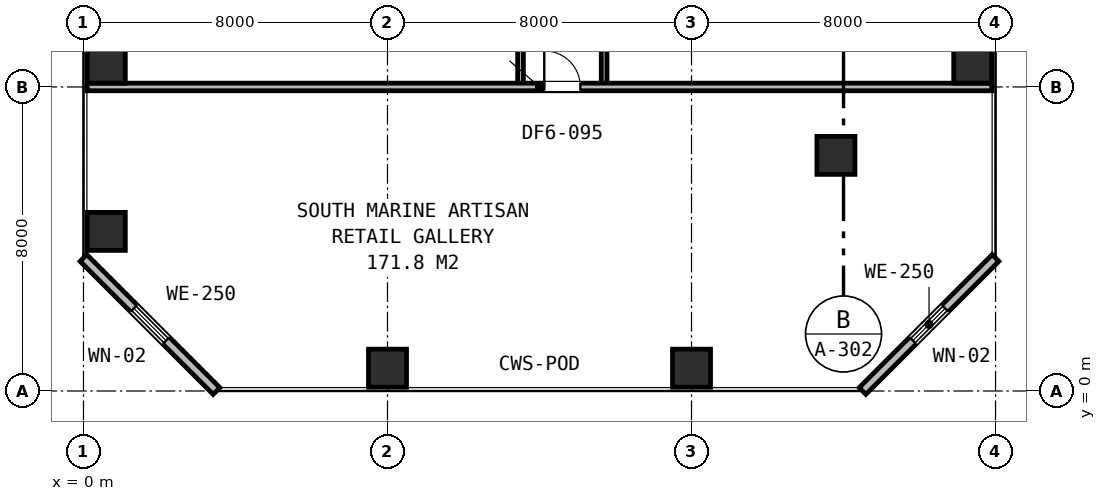
"""IFC4 building model, lengths in metres.
Left out: names, types, materials, properties, quantities, classifications, styles, units other than length and angle.
Written with IfcOpenShell. Run it as: python <this file> out.ifc"""

import sys

from ifc_helpers import new_model, si_unit, direction, frame, frame_2d, origin, origin_2d, place, context, subcontext, project, spatial, rectangle, extrude, element, fill, save


model = new_model("IFC4")
c1 = context("Model", 3, precision=1e-05, world=origin(), true_north=direction((0.0, 1.0)))
c2 = subcontext(c1, "Body", "Model", "MODEL_VIEW")
j1 = project(units=[si_unit("LENGTHUNIT", "METRE"), si_unit("PLANEANGLEUNIT", "RADIAN")], contexts=[c1])
p1 = place(None, origin())
s1 = spatial("IfcSite", under=j1, at=p1, CompositionType="ELEMENT")
p2 = place(p1, origin())
s2 = spatial("IfcBuilding", under=s1, at=p2, CompositionType="ELEMENT")
p3 = place(p2, frame((0.0, 0.0, 6.0)))
s3 = spatial("IfcBuildingStorey", under=s2, at=p3, CompositionType="ELEMENT", Elevation=6.0)
for number, where, z_axis, x_axis in (
    (1, (0.6, 8.6, 0.0), (0.0, 0.0, 1.0), (1.0, 0.0, 0.0)),
    (2, (0.6, 4.2, 0.0), (0.0, 0.0, 1.0), (1.0, 0.0, 0.0)),
    (3, (8.0, 0.6, 0.0), (0.0, 0.0, 1.0), (1.0, 0.0, 0.0)),
    (4, (16.0, 0.6, 0.0), (0.0, 0.0, 1.0), (1.0, 0.0, 0.0)),
    (5, (19.8, 6.2, 0.0), (0.0, 0.0, 1.0), (1.0, 0.0, 0.0)),
    (6, (23.4, 8.6, 0.0), (0.0, 0.0, 1.0), (1.0, 0.0, 0.0)),
):
    element("IfcColumn", number, at=place(p3, frame(where, z_axis=z_axis, x_axis=x_axis)), inside=s3, PredefinedType="COLUMN", context=c2, shape_type="SweptSolid", body=[
        extrude(rectangle(XDim=1.0, YDim=1.0, at=origin_2d()), origin(), (0.0, 0.0, 1.0), 5.1),
    ])
p4 = place(p3, frame((20.5, 0.0, 0.0), z_axis=(0.0, 0.0, 1.0), x_axis=(0.707106781187, 0.707106781187, 0.0)))
e7 = element("IfcWall", 7, at=p4, inside=s3, PredefinedType="STANDARD", context=c2, shape_type="SweptSolid", body=[
    extrude(rectangle(XDim=4.95, YDim=0.25, at=frame_2d((2.475, 0.0))), origin(), (0.0, 0.0, 1.0), 4.77),
])
p5 = place(p4, frame((1.875, 0.0, 0.85)))
e8 = element("IfcOpeningElement", 8, at=p5, cuts=e7, PredefinedType="OPENING", context=c2, shape_type="SweptSolid", body=[
    extrude(rectangle(XDim=1.2, YDim=1.6, at=frame_2d((0.6, 0.8))), frame((0.0, 0.135, 0.0), z_axis=(0.0, -1.0, 0.0), x_axis=(1.0, 0.0, 0.0)), (0.0, 0.0, 1.0), 0.27),
])
p6 = place(p3, frame((0.0, 3.5, 0.0), z_axis=(0.0, 0.0, 1.0), x_axis=(0.707106781187, -0.707106781187, 0.0)))
e9 = element("IfcWall", 9, at=p6, inside=s3, PredefinedType="STANDARD", context=c2, shape_type="SweptSolid", body=[
    extrude(rectangle(XDim=4.95, YDim=0.25, at=frame_2d((2.475, 0.0))), origin(), (0.0, 0.0, 1.0), 4.77),
])
p7 = place(p6, frame((1.875, 0.0, 0.85)))
e10 = element("IfcOpeningElement", 10, at=p7, cuts=e9, PredefinedType="OPENING", context=c2, shape_type="SweptSolid", body=[
    extrude(rectangle(XDim=1.2, YDim=1.6, at=frame_2d((0.6, 0.8))), frame((0.0, 0.135, 0.0), z_axis=(0.0, -1.0, 0.0), x_axis=(1.0, 0.0, 0.0)), (0.0, 0.0, 1.0), 0.27),
])
p8 = place(p3, frame((11.5, 8.0, 0.0), z_axis=(0.0, 0.0, 1.0), x_axis=(0.0, 1.0, 0.0)))
e11 = element("IfcWall", 11, at=p8, inside=s3, PredefinedType="PARTITIONING", context=c2, shape_type="SweptSolid", body=[
    extrude(rectangle(XDim=20.4, YDim=0.15, at=frame_2d((10.2, 0.0))), origin(), (0.0, 0.0, 1.0), 4.12),
])
p9 = place(p8, frame((9.3, 0.0, 0.0)))
e12 = element("IfcOpeningElement", 12, at=p9, cuts=e11, PredefinedType="OPENING", context=c2, shape_type="SweptSolid", body=[
    extrude(rectangle(XDim=1.8, YDim=2.15, at=frame_2d((0.9, 1.075))), frame((0.0, 0.085, 0.0), z_axis=(0.0, -1.0, 0.0), x_axis=(1.0, 0.0, 0.0)), (0.0, 0.0, 1.0), 0.17),
])
p10 = place(p3, frame((13.7, 8.0, 0.0), z_axis=(0.0, 0.0, 1.0), x_axis=(0.0, 1.0, 0.0)))
e13 = element("IfcWall", 13, at=p10, inside=s3, PredefinedType="PARTITIONING", context=c2, shape_type="SweptSolid", body=[
    extrude(rectangle(XDim=20.4, YDim=0.15, at=frame_2d((10.2, 0.0))), origin(), (0.0, 0.0, 1.0), 4.12),
])
p11 = place(p10, frame((9.3, 0.0, 0.0)))
e14 = element("IfcOpeningElement", 14, at=p11, cuts=e13, PredefinedType="OPENING", context=c2, shape_type="SweptSolid", body=[
    extrude(rectangle(XDim=1.8, YDim=2.15, at=frame_2d((0.9, 1.075))), frame((0.0, 0.085, 0.0), z_axis=(0.0, -1.0, 0.0), x_axis=(1.0, 0.0, 0.0)), (0.0, 0.0, 1.0), 0.17),
])
p12 = place(p3, frame((0.1, 8.0, 0.0), z_axis=(0.0, 0.0, 1.0), x_axis=(1.0, 0.0, 0.0)))
e15 = element("IfcWall", 15, at=p12, inside=s3, PredefinedType="PARTITIONING", context=c2, shape_type="SweptSolid", body=[
    extrude(rectangle(XDim=23.8, YDim=0.2, at=frame_2d((11.9, 0.0))), origin(), (0.0, 0.0, 1.0), 4.77),
])
p13 = place(p12, frame((12.025, 0.0, 0.0)))
e16 = element("IfcOpeningElement", 16, at=p13, cuts=e15, PredefinedType="OPENING", context=c2, shape_type="SweptSolid", body=[
    extrude(rectangle(XDim=0.95, YDim=2.15, at=frame_2d((0.475, 1.075))), frame((0.0, 0.11, 0.0), z_axis=(0.0, -1.0, 0.0), x_axis=(1.0, 0.0, 0.0)), (0.0, 0.0, 1.0), 0.22),
])
p14 = place(p5, origin())
e17 = element("IfcWindow", 17, at=p14, inside=s3, PartitioningType="SINGLE_PANEL", PredefinedType="WINDOW", context=c2, shape_type="SweptSolid", body=[
    extrude(rectangle(XDim=1.2, YDim=1.6, at=frame_2d((0.6, 0.8))), frame((0.0, 0.03, 0.0), z_axis=(0.0, -1.0, 0.0), x_axis=(1.0, 0.0, 0.0)), (0.0, 0.0, 1.0), 0.06),
])
fill(e8, e17)
p15 = place(p7, origin())
e18 = element("IfcWindow", 18, at=p15, inside=s3, PartitioningType="SINGLE_PANEL", PredefinedType="WINDOW", context=c2, shape_type="SweptSolid", body=[
    extrude(rectangle(XDim=1.2, YDim=1.6, at=frame_2d((0.6, 0.8))), frame((0.0, 0.03, 0.0), z_axis=(0.0, -1.0, 0.0), x_axis=(1.0, 0.0, 0.0)), (0.0, 0.0, 1.0), 0.06),
])
fill(e10, e18)
p16 = place(p13, origin())
e19 = element("IfcDoor", 19, at=p16, inside=s3, OperationType="SINGLE_SWING_LEFT", PredefinedType="DOOR", context=c2, shape_type="SweptSolid", body=[
    extrude(rectangle(XDim=0.95, YDim=2.15, at=frame_2d((0.475, 1.075))), frame((0.0, 0.025, 0.0), z_axis=(0.0, -1.0, 0.0), x_axis=(1.0, 0.0, 0.0)), (0.0, 0.0, 1.0), 0.05),
])
fill(e16, e19)
save(model, sys.argv[1])
